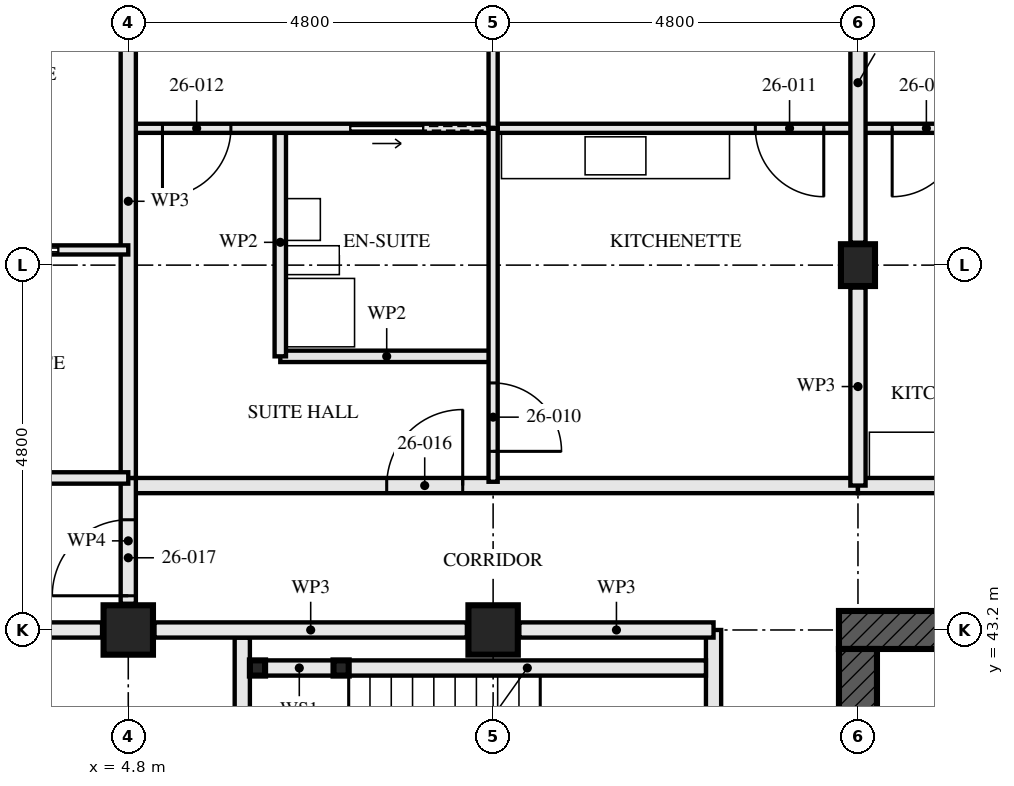
"""IFC4 building model, lengths in metres.
Left out: names, types, materials, properties, quantities, classifications, styles, units other than length and angle.
Written with IfcOpenShell. Run it as: python <this file> out.ifc"""

import sys

from ifc_helpers import new_model, si_unit, direction, frame, frame_2d, origin, origin_2d, place, context, subcontext, project, spatial, rectangle, hollow_rectangle, i_section, extrude, element, fill, save


model = new_model("IFC4")
c1 = context("Model", 3, precision=1e-05, world=origin(), true_north=direction((0.0, 1.0)))
c2 = subcontext(c1, "Body", "Model", "MODEL_VIEW")
j1 = project(units=[si_unit("LENGTHUNIT", "METRE"), si_unit("PLANEANGLEUNIT", "RADIAN")], contexts=[c1])
p1 = place(None, origin())
s1 = spatial("IfcSite", under=j1, at=p1, CompositionType="ELEMENT")
p2 = place(p1, origin())
s2 = spatial("IfcBuilding", under=s1, at=p2, CompositionType="ELEMENT")
p3 = place(p2, frame((0.0, 0.0, 98.0)))
s3 = spatial("IfcBuildingStorey", under=s2, at=p3, CompositionType="ELEMENT", Elevation=98.0)
for number, where, z_axis, x_axis in (
    (1, (4.8, 43.2, 0.0), (0.0, 0.0, 1.0), (0.0, 1.0, 0.0)),
    (2, (9.6, 43.2, 0.0), (0.0, 0.0, 1.0), (0.0, 1.0, 0.0)),
):
    element("IfcColumn", number, at=place(p3, frame(where, z_axis=z_axis, x_axis=x_axis)), inside=s3, PredefinedType="COLUMN", context=c2, shape_type="SweptSolid", body=[
        extrude(hollow_rectangle(XDim=0.65, YDim=0.65, WallThickness=0.05, at=origin_2d()), origin(), (0.0, 0.0, 1.0), 3.5),
    ])
p4 = place(p3, frame((14.4, 48.0, 0.0), z_axis=(0.0, 0.0, 1.0), x_axis=(1.0, 0.0, 0.0)))
e3 = element("IfcColumn", 3, at=p4, inside=s3, PredefinedType="COLUMN", context=c2, shape_type="SweptSolid", body=[
    extrude(i_section(OverallWidth=0.448, OverallDepth=0.55, WebThickness=0.072, FlangeThickness=0.115, FilletRadius=0.015, at=origin_2d()), origin(), (0.0, 0.0, 1.0), 3.5),
])
p5 = place(p3, frame((29.05, 43.2, -0.17), z_axis=(0.0, 0.0, 1.0), x_axis=(-1.0, 0.0, 0.0)))
e4 = element("IfcWall", 4, at=p5, inside=s3, PredefinedType="SHEAR", context=c2, shape_type="SweptSolid", body=[
    extrude(rectangle(XDim=14.9, YDim=0.5, at=frame_2d((7.45, 0.0))), origin(), (0.0, 0.0, 1.0), 3.5),
])
p6 = place(p5, frame((6.85, 0.0, 0.17)))
e5 = element("IfcOpeningElement", 5, at=p6, cuts=e4, PredefinedType="OPENING", context=c2, shape_type="SweptSolid", body=[
    extrude(rectangle(XDim=1.2, YDim=2.1, at=frame_2d((0.6, 1.05))), frame((0.0, 0.26, 0.0), z_axis=(0.0, -1.0, 0.0), x_axis=(1.0, 0.0, 0.0)), (0.0, 0.0, 1.0), 0.521),
])
p7 = place(p3, frame((14.4, 42.95, -0.17), z_axis=(0.0, 0.0, 1.0), x_axis=(0.0, -1.0, 0.0)))
e6 = element("IfcWall", 6, at=p7, inside=s3, PredefinedType="SHEAR", context=c2, shape_type="SweptSolid", body=[
    extrude(rectangle(XDim=13.9, YDim=0.5, at=frame_2d((6.95, 0.0))), origin(), (0.0, 0.0, 1.0), 3.5),
])
p8 = place(p7, frame((6.35, 0.0, 0.17)))
e7 = element("IfcOpeningElement", 7, at=p8, cuts=e6, PredefinedType="OPENING", context=c2, shape_type="SweptSolid", body=[
    extrude(rectangle(XDim=1.2, YDim=2.1, at=frame_2d((0.6, 1.05))), frame((0.0, 0.26, 0.0), z_axis=(0.0, -1.0, 0.0), x_axis=(1.0, 0.0, 0.0)), (0.0, 0.0, 1.0), 0.521),
])
for number, where, z_axis, x_axis in (
    (8, (6.5, 42.7, 0.0), (0.0, 0.0, 1.0), (1.0, 0.0, 0.0)),
    (9, (7.6, 42.7, 0.0), (0.0, 0.0, 1.0), (1.0, 0.0, 0.0)),
):
    element("IfcColumn", number, at=place(p3, frame(where, z_axis=z_axis, x_axis=x_axis)), inside=s3, PredefinedType="COLUMN", context=c2, shape_type="SweptSolid", body=[
        extrude(hollow_rectangle(XDim=0.2, YDim=0.2, WallThickness=0.008, at=origin_2d()), origin(), (0.0, 0.0, 1.0), 3.33),
    ])
p9 = place(p3, frame((6.6, 42.7, 0.0), z_axis=(0.0, 0.0, 1.0), x_axis=(1.0, 0.0, 0.0)))
e10 = element("IfcWall", 10, at=p9, inside=s3, PredefinedType="SOLIDWALL", context=c2, shape_type="SweptSolid", body=[
    extrude(rectangle(XDim=0.9, YDim=0.2, at=frame_2d((0.45, 0.0))), origin(), (0.0, 0.0, 1.0), 2.99),
])
p10 = place(p3, frame((7.7, 42.7, 0.0), z_axis=(0.0, 0.0, 1.0), x_axis=(1.0, 0.0, 0.0)))
e11 = element("IfcWall", 11, at=p10, inside=s3, PredefinedType="SOLIDWALL", context=c2, shape_type="SweptSolid", body=[
    extrude(rectangle(XDim=4.7, YDim=0.2, at=frame_2d((2.35, 0.0))), origin(), (0.0, 0.0, 1.0), 2.99),
])
p11 = place(p3, frame((6.3, 43.1, 0.0), z_axis=(0.0, 0.0, 1.0), x_axis=(0.0, -1.0, 0.0)))
e12 = element("IfcWall", 12, at=p11, inside=s3, PredefinedType="SOLIDWALL", context=c2, shape_type="SweptSolid", body=[
    extrude(rectangle(XDim=3.3, YDim=0.2, at=frame_2d((1.65, 0.0))), origin(), (0.0, 0.0, 1.0), 3.33),
])
p12 = place(p3, frame((12.5, 43.2, 0.0), z_axis=(0.0, 0.0, 1.0), x_axis=(0.0, -1.0, 0.0)))
e13 = element("IfcWall", 13, at=p12, inside=s3, PredefinedType="PARTITIONING", context=c2, shape_type="SweptSolid", body=[
    extrude(rectangle(XDim=14.84, YDim=0.2, at=frame_2d((7.42, 0.0))), origin(), (0.0, 0.0, 1.0), 2.32),
])
p13 = place(p12, frame((1.4, 0.0, 0.0)))
e14 = element("IfcOpeningElement", 14, at=p13, cuts=e13, PredefinedType="OPENING", context=c2, shape_type="SweptSolid", body=[
    extrude(rectangle(XDim=1.0, YDim=2.1, at=frame_2d((0.5, 1.05))), frame((0.0, 0.111, 0.0), z_axis=(0.0, -1.0, 0.0), x_axis=(1.0, 0.0, 0.0)), (0.0, 0.0, 1.0), 0.221),
])
p14 = place(p12, frame((5.2, 0.0, 0.0)))
e15 = element("IfcOpeningElement", 15, at=p14, cuts=e13, PredefinedType="OPENING", context=c2, shape_type="SweptSolid", body=[
    extrude(rectangle(XDim=1.0, YDim=2.1, at=frame_2d((0.5, 1.05))), frame((0.0, 0.111, 0.0), z_axis=(0.0, -1.0, 0.0), x_axis=(1.0, 0.0, 0.0)), (0.0, 0.0, 1.0), 0.221),
])
p15 = place(p12, frame((13.0, 0.0, 0.0)))
e16 = element("IfcOpeningElement", 16, at=p15, cuts=e13, PredefinedType="OPENING", context=c2, shape_type="SweptSolid", body=[
    extrude(rectangle(XDim=1.0, YDim=2.1, at=frame_2d((0.5, 1.05))), frame((0.0, 0.111, 0.0), z_axis=(0.0, -1.0, 0.0), x_axis=(1.0, 0.0, 0.0)), (0.0, 0.0, 1.0), 0.221),
])
p16 = place(p3, frame((6.8, 49.8, 0.0), z_axis=(0.0, 0.0, 1.0), x_axis=(0.0, -1.0, 0.0)))
e17 = element("IfcWall", 17, at=p16, inside=s3, PredefinedType="PARTITIONING", context=c2, shape_type="SweptSolid", body=[
    extrude(rectangle(XDim=3.0, YDim=0.15, at=frame_2d((1.5, 0.0))), origin(), (0.0, 0.0, 1.0), 2.55),
])
p17 = place(p3, frame((9.6, 46.8, 0.0), z_axis=(0.0, 0.0, 1.0), x_axis=(-1.0, 0.0, 0.0)))
e18 = element("IfcWall", 18, at=p17, inside=s3, PredefinedType="PARTITIONING", context=c2, shape_type="SweptSolid", body=[
    extrude(rectangle(XDim=2.8, YDim=0.15, at=frame_2d((1.4, 0.0))), origin(), (0.0, 0.0, 1.0), 3.33),
])
p18 = place(p3, frame((9.6, 49.8, 0.0), z_axis=(0.0, 0.0, 1.0), x_axis=(0.0, -1.0, 0.0)))
e19 = element("IfcWall", 19, at=p18, inside=s3, PredefinedType="PARTITIONING", context=c2, shape_type="SweptSolid", body=[
    extrude(rectangle(XDim=4.65, YDim=0.12, at=frame_2d((2.325, 0.0))), origin(), (0.0, 0.0, 1.0), 2.55),
])
p19 = place(p18, frame((3.35, 0.0, 0.0)))
e20 = element("IfcOpeningElement", 20, at=p19, cuts=e19, PredefinedType="OPENING", context=c2, shape_type="SweptSolid", body=[
    extrude(rectangle(XDim=0.9, YDim=2.1, at=frame_2d((0.45, 1.05))), frame((0.0, 0.071, 0.0), z_axis=(0.0, -1.0, 0.0), x_axis=(1.0, 0.0, 0.0)), (0.0, 0.0, 1.0), 0.141),
])
p20 = place(p3, frame((14.4, 49.8, 0.0), z_axis=(0.0, 0.0, 1.0), x_axis=(-1.0, 0.0, 0.0)))
e21 = element("IfcWall", 21, at=p20, inside=s3, PredefinedType="PARTITIONING", context=c2, shape_type="SweptSolid", body=[
    extrude(rectangle(XDim=4.8, YDim=0.12, at=frame_2d((2.4, 0.0))), origin(), (0.0, 0.0, 1.0), 3.33),
])
p21 = place(p20, frame((0.45, 0.0, 0.0)))
e22 = element("IfcOpeningElement", 22, at=p21, cuts=e21, PredefinedType="OPENING", context=c2, shape_type="SweptSolid", body=[
    extrude(rectangle(XDim=0.9, YDim=2.1, at=frame_2d((0.45, 1.05))), frame((0.0, 0.071, 0.0), z_axis=(0.0, -1.0, 0.0), x_axis=(1.0, 0.0, 0.0)), (0.0, 0.0, 1.0), 0.141),
])
p22 = place(p3, frame((9.6, 49.8, 0.0), z_axis=(0.0, 0.0, 1.0), x_axis=(-1.0, 0.0, 0.0)))
e23 = element("IfcWall", 23, at=p22, inside=s3, PredefinedType="PARTITIONING", context=c2, shape_type="SweptSolid", body=[
    extrude(rectangle(XDim=4.8, YDim=0.12, at=frame_2d((2.4, 0.0))), origin(), (0.0, 0.0, 1.0), 3.33),
])
p23 = place(p22, frame((3.45, 0.0, 0.0)))
e24 = element("IfcOpeningElement", 24, at=p23, cuts=e23, PredefinedType="OPENING", context=c2, shape_type="SweptSolid", body=[
    extrude(rectangle(XDim=0.9, YDim=2.1, at=frame_2d((0.45, 1.05))), frame((0.0, 0.071, 0.0), z_axis=(0.0, -1.0, 0.0), x_axis=(1.0, 0.0, 0.0)), (0.0, 0.0, 1.0), 0.141),
])
p24 = place(p22, frame((0.925, 0.0, 0.0)))
e25 = element("IfcOpeningElement", 25, at=p24, cuts=e23, PredefinedType="OPENING", context=c2, shape_type="SweptSolid", body=[
    extrude(rectangle(XDim=0.95, YDim=2.1, at=frame_2d((0.475, 1.05))), frame((0.0, 0.071, 0.0), z_axis=(0.0, -1.0, 0.0), x_axis=(1.0, 0.0, 0.0)), (0.0, 0.0, 1.0), 0.141),
])
p25 = place(p3, frame((9.6, 57.353, 0.0), z_axis=(0.0, 0.0, 1.0), x_axis=(0.0, -1.0, 0.0)))
e26 = element("IfcWall", 26, at=p25, inside=s3, PredefinedType="PARTITIONING", context=c2, shape_type="SweptSolid", body=[
    extrude(rectangle(XDim=7.553, YDim=0.12, at=frame_2d((3.776, 0.0))), origin(), (0.0, 0.0, 1.0), 2.55),
])
p26 = place(p3, frame((4.8, 52.48, 0.0), z_axis=(0.0, 0.0, 1.0), x_axis=(0.0, -1.0, 0.0)))
e27 = element("IfcWall", 27, at=p26, inside=s3, PredefinedType="PARTITIONING", context=c2, shape_type="SweptSolid", body=[
    extrude(rectangle(XDim=7.28, YDim=0.2, at=frame_2d((3.64, 0.0))), origin(), (0.0, 0.0, 1.0), 2.55),
])
p27 = place(p3, frame((4.8, 45.2, 0.0), z_axis=(0.0, 0.0, 1.0), x_axis=(-1.0, 0.0, 0.0)))
e28 = element("IfcWall", 28, at=p27, inside=s3, PredefinedType="PARTITIONING", context=c2, shape_type="SweptSolid", body=[
    extrude(rectangle(XDim=2.8, YDim=0.15, at=frame_2d((1.4, 0.0))), origin(), (0.0, 0.0, 1.0), 3.33),
])
p28 = place(p3, frame((4.8, 48.2, 0.0), z_axis=(0.0, 0.0, 1.0), x_axis=(-1.0, 0.0, 0.0)))
e29 = element("IfcWall", 29, at=p28, inside=s3, PredefinedType="PARTITIONING", context=c2, shape_type="SweptSolid", body=[
    extrude(rectangle(XDim=4.553, YDim=0.12, at=frame_2d((2.276, 0.0))), origin(), (0.0, 0.0, 1.0), 3.33),
])
p29 = place(p28, frame((2.975, 0.0, 0.0)))
e30 = element("IfcOpeningElement", 30, at=p29, cuts=e29, PredefinedType="OPENING", context=c2, shape_type="SweptSolid", body=[
    extrude(rectangle(XDim=0.9, YDim=2.1, at=frame_2d((0.45, 1.05))), frame((0.0, 0.071, 0.0), z_axis=(0.0, -1.0, 0.0), x_axis=(1.0, 0.0, 0.0)), (0.0, 0.0, 1.0), 0.141),
])
p30 = place(p28, frame((0.925, 0.0, 0.0)))
e31 = element("IfcOpeningElement", 31, at=p30, cuts=e29, PredefinedType="OPENING", context=c2, shape_type="SweptSolid", body=[
    extrude(rectangle(XDim=0.95, YDim=2.1, at=frame_2d((0.475, 1.05))), frame((0.0, 0.071, 0.0), z_axis=(0.0, -1.0, 0.0), x_axis=(1.0, 0.0, 0.0)), (0.0, 0.0, 1.0), 0.141),
])
p31 = place(p3, frame((14.4, 45.1, 0.0), z_axis=(0.0, 0.0, 1.0), x_axis=(-1.0, 0.0, 0.0)))
e32 = element("IfcWall", 32, at=p31, inside=s3, PredefinedType="PARTITIONING", context=c2, shape_type="SweptSolid", body=[
    extrude(rectangle(XDim=9.6, YDim=0.2, at=frame_2d((4.8, 0.0))), origin(), (0.0, 0.0, 1.0), 3.33),
])
p32 = place(p31, frame((5.2, 0.0, 0.0)))
e33 = element("IfcOpeningElement", 33, at=p32, cuts=e32, PredefinedType="OPENING", context=c2, shape_type="SweptSolid", body=[
    extrude(rectangle(XDim=1.0, YDim=2.1, at=frame_2d((0.5, 1.05))), frame((0.0, 0.111, 0.0), z_axis=(0.0, -1.0, 0.0), x_axis=(1.0, 0.0, 0.0)), (0.0, 0.0, 1.0), 0.221),
])
p33 = place(p3, frame((4.8, 45.2, 0.0), z_axis=(0.0, 0.0, 1.0), x_axis=(0.0, -1.0, 0.0)))
e34 = element("IfcWall", 34, at=p33, inside=s3, PredefinedType="PARTITIONING", context=c2, shape_type="SweptSolid", body=[
    extrude(rectangle(XDim=1.655, YDim=0.2, at=frame_2d((0.828, 0.0))), origin(), (0.0, 0.0, 1.0), 3.33),
])
p34 = place(p33, frame((0.55, 0.0, 0.0)))
e35 = element("IfcOpeningElement", 35, at=p34, cuts=e34, PredefinedType="OPENING", context=c2, shape_type="SweptSolid", body=[
    extrude(rectangle(XDim=1.0, YDim=2.1, at=frame_2d((0.5, 1.05))), frame((0.0, 0.111, 0.0), z_axis=(0.0, -1.0, 0.0), x_axis=(1.0, 0.0, 0.0)), (0.0, 0.0, 1.0), 0.221),
])
p35 = place(p3, frame((19.2, 49.8, 0.0), z_axis=(0.0, 0.0, 1.0), x_axis=(-1.0, 0.0, 0.0)))
e36 = element("IfcWall", 36, at=p35, inside=s3, PredefinedType="PARTITIONING", context=c2, shape_type="SweptSolid", body=[
    extrude(rectangle(XDim=4.8, YDim=0.12, at=frame_2d((2.4, 0.0))), origin(), (0.0, 0.0, 1.0), 3.33),
])
p36 = place(p35, frame((3.45, 0.0, 0.0)))
e37 = element("IfcOpeningElement", 37, at=p36, cuts=e36, PredefinedType="OPENING", context=c2, shape_type="SweptSolid", body=[
    extrude(rectangle(XDim=0.9, YDim=2.1, at=frame_2d((0.45, 1.05))), frame((0.0, 0.071, 0.0), z_axis=(0.0, -1.0, 0.0), x_axis=(1.0, 0.0, 0.0)), (0.0, 0.0, 1.0), 0.141),
])
p37 = place(p35, frame((0.925, 0.0, 0.0)))
e38 = element("IfcOpeningElement", 38, at=p37, cuts=e36, PredefinedType="OPENING", context=c2, shape_type="SweptSolid", body=[
    extrude(rectangle(XDim=0.95, YDim=2.1, at=frame_2d((0.475, 1.05))), frame((0.0, 0.071, 0.0), z_axis=(0.0, -1.0, 0.0), x_axis=(1.0, 0.0, 0.0)), (0.0, 0.0, 1.0), 0.141),
])
p38 = place(p3, frame((29.24, 45.1, 0.0), z_axis=(0.0, 0.0, 1.0), x_axis=(-1.0, 0.0, 0.0)))
e39 = element("IfcWall", 39, at=p38, inside=s3, PredefinedType="PARTITIONING", context=c2, shape_type="SweptSolid", body=[
    extrude(rectangle(XDim=14.84, YDim=0.2, at=frame_2d((7.42, 0.0))), origin(), (0.0, 0.0, 1.0), 2.32),
])
p39 = place(p38, frame((0.84, 0.0, 0.0)))
e40 = element("IfcOpeningElement", 40, at=p39, cuts=e39, PredefinedType="OPENING", context=c2, shape_type="SweptSolid", body=[
    extrude(rectangle(XDim=1.0, YDim=2.1, at=frame_2d((0.5, 1.05))), frame((0.0, 0.111, 0.0), z_axis=(0.0, -1.0, 0.0), x_axis=(1.0, 0.0, 0.0)), (0.0, 0.0, 1.0), 0.221),
])
p40 = place(p38, frame((5.64, 0.0, 0.0)))
e41 = element("IfcOpeningElement", 41, at=p40, cuts=e39, PredefinedType="OPENING", context=c2, shape_type="SweptSolid", body=[
    extrude(rectangle(XDim=1.0, YDim=2.1, at=frame_2d((0.5, 1.05))), frame((0.0, 0.111, 0.0), z_axis=(0.0, -1.0, 0.0), x_axis=(1.0, 0.0, 0.0)), (0.0, 0.0, 1.0), 0.221),
])
p41 = place(p38, frame((10.44, 0.0, 0.0)))
e42 = element("IfcOpeningElement", 42, at=p41, cuts=e39, PredefinedType="OPENING", context=c2, shape_type="SweptSolid", body=[
    extrude(rectangle(XDim=1.0, YDim=2.1, at=frame_2d((0.5, 1.05))), frame((0.0, 0.111, 0.0), z_axis=(0.0, -1.0, 0.0), x_axis=(1.0, 0.0, 0.0)), (0.0, 0.0, 1.0), 0.221),
])
p42 = place(p3, frame((12.5, 43.2, 0.0), z_axis=(0.0, 0.0, 1.0), x_axis=(-1.0, 0.0, 0.0)))
e43 = element("IfcWall", 43, at=p42, inside=s3, PredefinedType="PARTITIONING", context=c2, shape_type="SweptSolid", body=[
    extrude(rectangle(XDim=2.555, YDim=0.2, at=frame_2d((1.277, 0.0))), origin(), (0.0, 0.0, 1.0), 2.32),
])
p43 = place(p3, frame((9.255, 43.2, 0.0), z_axis=(0.0, 0.0, 1.0), x_axis=(-1.0, 0.0, 0.0)))
e44 = element("IfcWall", 44, at=p43, inside=s3, PredefinedType="PARTITIONING", context=c2, shape_type="SweptSolid", body=[
    extrude(rectangle(XDim=4.11, YDim=0.2, at=frame_2d((2.055, 0.0))), origin(), (0.0, 0.0, 1.0), 2.32),
])
p44 = place(p3, frame((4.455, 43.2, 0.0), z_axis=(0.0, 0.0, 1.0), x_axis=(-1.0, 0.0, 0.0)))
e45 = element("IfcWall", 45, at=p44, inside=s3, PredefinedType="PARTITIONING", context=c2, shape_type="SweptSolid", body=[
    extrude(rectangle(XDim=4.151, YDim=0.2, at=frame_2d((2.075, 0.0))), origin(), (0.0, 0.0, 1.0), 2.32),
])
p45 = place(p3, frame((14.4, 45.1, 0.0), z_axis=(0.0, 0.0, 1.0), x_axis=(0.0, 1.0, 0.0)))
e46 = element("IfcWall", 46, at=p45, inside=s3, PredefinedType="PARTITIONING", context=c2, shape_type="SweptSolid", body=[
    extrude(rectangle(XDim=2.605, YDim=0.2, at=frame_2d((1.302, 0.0))), origin(), (0.0, 0.0, 1.0), 2.32),
])
p46 = place(p3, frame((14.4, 48.295, 0.0), z_axis=(0.0, 0.0, 1.0), x_axis=(0.0, 1.0, 0.0)))
e47 = element("IfcWall", 47, at=p46, inside=s3, PredefinedType="PARTITIONING", context=c2, shape_type="SweptSolid", body=[
    extrude(rectangle(XDim=4.21, YDim=0.2, at=frame_2d((2.105, 0.0))), origin(), (0.0, 0.0, 1.0), 2.32),
])
p47 = place(p19, origin())
e48 = element("IfcDoor", 48, at=p47, inside=s3, OperationType="SINGLE_SWING_LEFT", PredefinedType="DOOR", context=c2, shape_type="SweptSolid", body=[
    extrude(rectangle(XDim=0.9, YDim=2.1, at=frame_2d((0.45, 1.05))), frame((0.0, 0.022, 0.0), z_axis=(0.0, -1.0, 0.0), x_axis=(1.0, 0.0, 0.0)), (0.0, 0.0, 1.0), 0.044),
])
fill(e20, e48)
p48 = place(p21, origin())
e49 = element("IfcDoor", 49, at=p48, inside=s3, OperationType="SINGLE_SWING_RIGHT", PredefinedType="DOOR", context=c2, shape_type="SweptSolid", body=[
    extrude(rectangle(XDim=0.9, YDim=2.1, at=frame_2d((0.45, 1.05))), frame((0.0, 0.022, 0.0), z_axis=(0.0, -1.0, 0.0), x_axis=(1.0, 0.0, 0.0)), (0.0, 0.0, 1.0), 0.044),
])
fill(e22, e49)
p49 = place(p23, origin())
e50 = element("IfcDoor", 50, at=p49, inside=s3, OperationType="SINGLE_SWING_LEFT", PredefinedType="DOOR", context=c2, shape_type="SweptSolid", body=[
    extrude(rectangle(XDim=0.9, YDim=2.1, at=frame_2d((0.45, 1.05))), frame((0.0, 0.022, 0.0), z_axis=(0.0, -1.0, 0.0), x_axis=(1.0, 0.0, 0.0)), (0.0, 0.0, 1.0), 0.044),
])
fill(e24, e50)
p50 = place(p24, origin())
e51 = element("IfcDoor", 51, at=p50, inside=s3, OperationType="SLIDING_TO_RIGHT", PredefinedType="DOOR", context=c2, shape_type="SweptSolid", body=[
    extrude(rectangle(XDim=0.95, YDim=2.1, at=frame_2d((0.475, 1.05))), frame((0.0, 0.022, 0.0), z_axis=(0.0, -1.0, 0.0), x_axis=(1.0, 0.0, 0.0)), (0.0, 0.0, 1.0), 0.044),
])
fill(e25, e51)
p51 = place(p30, origin())
e52 = element("IfcDoor", 52, at=p51, inside=s3, OperationType="SLIDING_TO_LEFT", PredefinedType="DOOR", context=c2, shape_type="SweptSolid", body=[
    extrude(rectangle(XDim=0.95, YDim=2.1, at=frame_2d((0.475, 1.05))), frame((0.0, 0.022, 0.0), z_axis=(0.0, -1.0, 0.0), x_axis=(1.0, 0.0, 0.0)), (0.0, 0.0, 1.0), 0.044),
])
fill(e31, e52)
p52 = place(p32, frame((1.0, 0.0, 0.0), z_axis=(0.0, 0.0, 1.0), x_axis=(-1.0, 0.0, 0.0)))
e53 = element("IfcDoor", 53, at=p52, inside=s3, OperationType="SINGLE_SWING_LEFT", PredefinedType="DOOR", context=c2, shape_type="SweptSolid", body=[
    extrude(rectangle(XDim=1.0, YDim=2.1, at=frame_2d((0.5, 1.05))), frame((0.0, 0.027, 0.0), z_axis=(0.0, -1.0, 0.0), x_axis=(1.0, 0.0, 0.0)), (0.0, 0.0, 1.0), 0.054),
])
fill(e33, e53)
p53 = place(p34, frame((1.0, 0.0, 0.0), z_axis=(0.0, 0.0, 1.0), x_axis=(-1.0, 0.0, 0.0)))
e54 = element("IfcDoor", 54, at=p53, inside=s3, OperationType="SINGLE_SWING_RIGHT", PredefinedType="DOOR", context=c2, shape_type="SweptSolid", body=[
    extrude(rectangle(XDim=1.0, YDim=2.1, at=frame_2d((0.5, 1.05))), frame((0.0, 0.027, 0.0), z_axis=(0.0, -1.0, 0.0), x_axis=(1.0, 0.0, 0.0)), (0.0, 0.0, 1.0), 0.054),
])
fill(e35, e54)
p54 = place(p36, origin())
e55 = element("IfcDoor", 55, at=p54, inside=s3, OperationType="SINGLE_SWING_LEFT", PredefinedType="DOOR", context=c2, shape_type="SweptSolid", body=[
    extrude(rectangle(XDim=0.9, YDim=2.1, at=frame_2d((0.45, 1.05))), frame((0.0, 0.022, 0.0), z_axis=(0.0, -1.0, 0.0), x_axis=(1.0, 0.0, 0.0)), (0.0, 0.0, 1.0), 0.044),
])
fill(e37, e55)
save(model, sys.argv[1])
